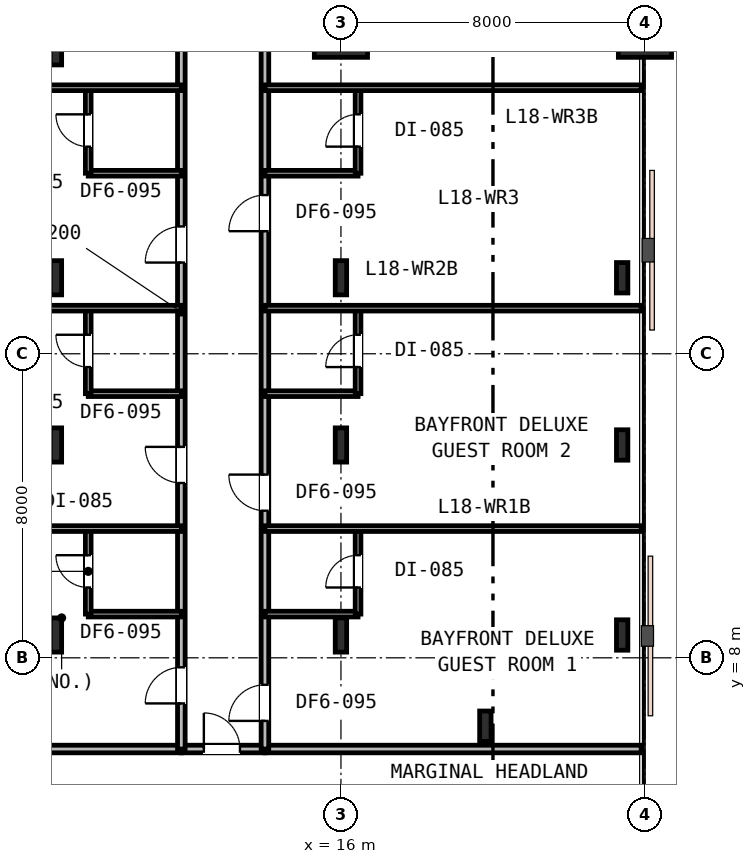
"""IFC4 building model, lengths in metres.
Left out: names, types, materials, properties, quantities, classifications, styles, units other than length and angle.
Written with IfcOpenShell. Run it as: python <this file> out.ifc"""

import sys

from ifc_helpers import new_model, si_unit, direction, frame, frame_2d, origin, origin_2d, place, context, subcontext, project, spatial, rectangle, i_section, extrude, element, fill, save


model = new_model("IFC4")
c1 = context("Model", 3, precision=1e-05, world=origin(), true_north=direction((0.0, 1.0)))
c2 = subcontext(c1, "Body", "Model", "MODEL_VIEW")
j1 = project(units=[si_unit("LENGTHUNIT", "METRE"), si_unit("PLANEANGLEUNIT", "RADIAN")], contexts=[c1])
p1 = place(None, origin())
s1 = spatial("IfcSite", under=j1, at=p1, CompositionType="ELEMENT")
p2 = place(p1, origin())
s2 = spatial("IfcBuilding", under=s1, at=p2, CompositionType="ELEMENT")
p3 = place(p2, frame((0.0, 0.0, 72.6)))
s3 = spatial("IfcBuildingStorey", under=s2, at=p3, CompositionType="ELEMENT", Elevation=72.6)
p4 = place(p3, frame((8.5, 24.0, 0.0), z_axis=(0.0, 0.0, 1.0), x_axis=(1.0, 0.0, 0.0)))
e1 = element("IfcColumn", 1, at=p4, inside=s3, PredefinedType="COLUMN", context=c2, shape_type="SweptSolid", body=[
    extrude(i_section(OverallWidth=0.3, OverallDepth=0.8, WebThickness=0.018, FlangeThickness=0.033, FilletRadius=0.03, at=origin_2d()), origin(), (0.0, 0.0, 1.0), 3.6),
])
for number, where, z_axis, x_axis in (
    (2, (16.0, 24.5, 0.0), (0.0, 0.0, 1.0), (1.0, 0.0, 0.0)),
    (3, (24.0, 24.5, 0.0), (0.0, 0.0, 1.0), (1.0, 0.0, 0.0)),
):
    element("IfcColumn", number, at=place(p3, frame(where, z_axis=z_axis, x_axis=x_axis)), inside=s3, PredefinedType="COLUMN", context=c2, shape_type="SweptSolid", body=[
        extrude(rectangle(XDim=1.4, YDim=1.4, at=origin_2d()), origin(), (0.0, 0.0, 1.0), 3.6),
    ])
for number, where, z_axis, x_axis in (
    (4, (19.8, 6.2, 0.0), (0.0, 0.0, 1.0), (1.0, 0.0, 0.0)),
    (5, (23.4, 8.6, 0.0), (0.0, 0.0, 1.0), (1.0, 0.0, 0.0)),
    (6, (23.4, 13.6, 0.0), (0.0, 0.0, 1.0), (1.0, 0.0, 0.0)),
    (7, (23.4, 18.0, 0.0), (0.0, 0.0, 1.0), (1.0, 0.0, 0.0)),
):
    element("IfcColumn", number, at=place(p3, frame(where, z_axis=z_axis, x_axis=x_axis)), inside=s3, PredefinedType="COLUMN", context=c2, shape_type="SweptSolid", body=[
        extrude(i_section(OverallWidth=0.3, OverallDepth=0.8, WebThickness=0.018, FlangeThickness=0.033, FilletRadius=0.03, at=origin_2d()), origin(), (0.0, 0.0, 1.0), 3.6),
    ])
for number, where, z_axis, x_axis in (
    (8, (8.5, 8.6, 0.0), (0.0, 0.0, 1.0), (1.0, 0.0, 0.0)),
    (9, (16.0, 8.6, 0.0), (0.0, 0.0, 1.0), (1.0, 0.0, 0.0)),
    (10, (8.5, 13.6, 0.0), (0.0, 0.0, 1.0), (1.0, 0.0, 0.0)),
    (11, (16.0, 13.6, 0.0), (0.0, 0.0, 1.0), (1.0, 0.0, 0.0)),
    (12, (8.5, 18.0, 0.0), (0.0, 0.0, 1.0), (1.0, 0.0, 0.0)),
    (13, (16.0, 18.0, 0.0), (0.0, 0.0, 1.0), (1.0, 0.0, 0.0)),
):
    element("IfcColumn", number, at=place(p3, frame(where, z_axis=z_axis, x_axis=x_axis)), inside=s3, PredefinedType="COLUMN", context=c2, shape_type="SweptSolid", body=[
        extrude(i_section(OverallWidth=0.3, OverallDepth=0.9, WebThickness=0.018, FlangeThickness=0.035, FilletRadius=0.03, at=origin_2d()), origin(), (0.0, 0.0, 1.0), 3.6),
    ])
p5 = place(p3, frame((0.1, 5.6, 0.0), z_axis=(0.0, 0.0, 1.0), x_axis=(1.0, 0.0, 0.0)))
e14 = element("IfcWall", 14, at=p5, inside=s3, PredefinedType="PARTITIONING", context=c2, shape_type="SweptSolid", body=[
    extrude(rectangle(XDim=11.7, YDim=0.2, at=frame_2d((5.85, 0.0))), origin(), (0.0, 0.0, 1.0), 2.92),
])
p6 = place(p3, frame((14.0, 5.6, 0.0), z_axis=(0.0, 0.0, 1.0), x_axis=(1.0, 0.0, 0.0)))
e15 = element("IfcWall", 15, at=p6, inside=s3, PredefinedType="PARTITIONING", context=c2, shape_type="SweptSolid", body=[
    extrude(rectangle(XDim=9.9, YDim=0.2, at=frame_2d((4.95, 0.0))), origin(), (0.0, 0.0, 1.0), 2.83),
])
p7 = place(p3, frame((11.8, 5.6, 0.0), z_axis=(0.0, 0.0, 1.0), x_axis=(1.0, 0.0, 0.0)))
e16 = element("IfcWall", 16, at=p7, inside=s3, PredefinedType="PARTITIONING", context=c2, shape_type="SweptSolid", body=[
    extrude(rectangle(XDim=2.2, YDim=0.2, at=frame_2d((1.1, 0.0))), origin(), (0.0, 0.0, 1.0), 3.33),
])
p8 = place(p7, frame((0.593, 0.0, 0.0)))
e17 = element("IfcOpeningElement", 17, at=p8, cuts=e16, PredefinedType="OPENING", context=c2, shape_type="SweptSolid", body=[
    extrude(rectangle(XDim=0.95, YDim=2.15, at=frame_2d((0.475, 1.075))), frame((0.0, 0.11, 0.0), z_axis=(0.0, -1.0, 0.0), x_axis=(1.0, 0.0, 0.0)), (0.0, 0.0, 1.0), 0.22),
])
p9 = place(p3, frame((11.8, 5.6, 0.0), z_axis=(0.0, 0.0, 1.0), x_axis=(0.0, 1.0, 0.0)))
e18 = element("IfcWall", 18, at=p9, inside=s3, PredefinedType="PARTITIONING", context=c2, shape_type="SweptSolid", body=[
    extrude(rectangle(XDim=23.0, YDim=0.2, at=frame_2d((11.5, 0.0))), origin(), (0.0, 0.0, 1.0), 2.83),
])
p10 = place(p9, frame((1.2, 0.0, 0.0)))
e19 = element("IfcOpeningElement", 19, at=p10, cuts=e18, PredefinedType="OPENING", context=c2, shape_type="SweptSolid", body=[
    extrude(rectangle(XDim=0.95, YDim=2.15, at=frame_2d((0.475, 1.075))), frame((0.0, 0.11, 0.0), z_axis=(0.0, -1.0, 0.0), x_axis=(1.0, 0.0, 0.0)), (0.0, 0.0, 1.0), 0.22),
])
p11 = place(p9, frame((7.0, 0.0, 0.0)))
e20 = element("IfcOpeningElement", 20, at=p11, cuts=e18, PredefinedType="OPENING", context=c2, shape_type="SweptSolid", body=[
    extrude(rectangle(XDim=0.95, YDim=2.15, at=frame_2d((0.475, 1.075))), frame((0.0, 0.11, 0.0), z_axis=(0.0, -1.0, 0.0), x_axis=(1.0, 0.0, 0.0)), (0.0, 0.0, 1.0), 0.22),
])
p12 = place(p9, frame((12.8, 0.0, 0.0)))
e21 = element("IfcOpeningElement", 21, at=p12, cuts=e18, PredefinedType="OPENING", context=c2, shape_type="SweptSolid", body=[
    extrude(rectangle(XDim=0.95, YDim=2.15, at=frame_2d((0.475, 1.075))), frame((0.0, 0.11, 0.0), z_axis=(0.0, -1.0, 0.0), x_axis=(1.0, 0.0, 0.0)), (0.0, 0.0, 1.0), 0.22),
])
p13 = place(p9, frame((18.515, 0.0, 0.0)))
e22 = element("IfcOpeningElement", 22, at=p13, cuts=e18, PredefinedType="OPENING", context=c2, shape_type="SweptSolid", body=[
    extrude(rectangle(XDim=0.95, YDim=2.15, at=frame_2d((0.475, 1.075))), frame((0.0, 0.11, 0.0), z_axis=(0.0, -1.0, 0.0), x_axis=(1.0, 0.0, 0.0)), (0.0, 0.0, 1.0), 0.22),
])
p14 = place(p3, frame((9.35, 9.15, 0.0), z_axis=(0.0, 0.0, 1.0), x_axis=(1.0, 0.0, 0.0)))
e23 = element("IfcWall", 23, at=p14, inside=s3, PredefinedType="PARTITIONING", context=c2, shape_type="SweptSolid", body=[
    extrude(rectangle(XDim=2.45, YDim=0.15, at=frame_2d((1.225, 0.0))), origin(), (0.0, 0.0, 1.0), 3.02),
])
p15 = place(p3, frame((9.35, 9.15, 0.0), z_axis=(0.0, 0.0, 1.0), x_axis=(0.0, 1.0, 0.0)))
e24 = element("IfcWall", 24, at=p15, inside=s3, PredefinedType="PARTITIONING", context=c2, shape_type="SweptSolid", body=[
    extrude(rectangle(XDim=2.25, YDim=0.15, at=frame_2d((1.125, 0.0))), origin(), (0.0, 0.0, 1.0), 3.33),
])
p16 = place(p15, frame((0.7, 0.0, 0.0)))
e25 = element("IfcOpeningElement", 25, at=p16, cuts=e24, PredefinedType="OPENING", context=c2, shape_type="SweptSolid", body=[
    extrude(rectangle(XDim=0.85, YDim=2.15, at=frame_2d((0.425, 1.075))), frame((0.0, 0.085, 0.0), z_axis=(0.0, -1.0, 0.0), x_axis=(1.0, 0.0, 0.0)), (0.0, 0.0, 1.0), 0.17),
])
p17 = place(p3, frame((0.1, 11.4, 0.0), z_axis=(0.0, 0.0, 1.0), x_axis=(1.0, 0.0, 0.0)))
e26 = element("IfcWall", 26, at=p17, inside=s3, PredefinedType="PARTITIONING", context=c2, shape_type="SweptSolid", body=[
    extrude(rectangle(XDim=11.7, YDim=0.15, at=frame_2d((5.85, 0.0))), origin(), (0.0, 0.0, 1.0), 2.83),
])
p18 = place(p3, frame((14.0, 5.6, 0.0), z_axis=(0.0, 0.0, 1.0), x_axis=(0.0, 1.0, 0.0)))
e27 = element("IfcWall", 27, at=p18, inside=s3, PredefinedType="PARTITIONING", context=c2, shape_type="SweptSolid", body=[
    extrude(rectangle(XDim=23.0, YDim=0.2, at=frame_2d((11.5, 0.0))), origin(), (0.0, 0.0, 1.0), 2.83),
])
p19 = place(p18, frame((0.74, 0.0, 0.0)))
e28 = element("IfcOpeningElement", 28, at=p19, cuts=e27, PredefinedType="OPENING", context=c2, shape_type="SweptSolid", body=[
    extrude(rectangle(XDim=0.95, YDim=2.15, at=frame_2d((0.475, 1.075))), frame((0.0, 0.11, 0.0), z_axis=(0.0, -1.0, 0.0), x_axis=(1.0, 0.0, 0.0)), (0.0, 0.0, 1.0), 0.22),
])
p20 = place(p18, frame((6.271, 0.0, 0.0)))
e29 = element("IfcOpeningElement", 29, at=p20, cuts=e27, PredefinedType="OPENING", context=c2, shape_type="SweptSolid", body=[
    extrude(rectangle(XDim=0.95, YDim=2.15, at=frame_2d((0.475, 1.075))), frame((0.0, 0.11, 0.0), z_axis=(0.0, -1.0, 0.0), x_axis=(1.0, 0.0, 0.0)), (0.0, 0.0, 1.0), 0.22),
])
p21 = place(p18, frame((13.626, 0.0, 0.0)))
e30 = element("IfcOpeningElement", 30, at=p21, cuts=e27, PredefinedType="OPENING", context=c2, shape_type="SweptSolid", body=[
    extrude(rectangle(XDim=0.95, YDim=2.15, at=frame_2d((0.475, 1.075))), frame((0.0, 0.11, 0.0), z_axis=(0.0, -1.0, 0.0), x_axis=(1.0, 0.0, 0.0)), (0.0, 0.0, 1.0), 0.22),
])
p22 = place(p18, frame((20.393, 0.0, 0.0)))
e31 = element("IfcOpeningElement", 31, at=p22, cuts=e27, PredefinedType="OPENING", context=c2, shape_type="SweptSolid", body=[
    extrude(rectangle(XDim=0.95, YDim=2.15, at=frame_2d((0.475, 1.075))), frame((0.0, 0.11, 0.0), z_axis=(0.0, -1.0, 0.0), x_axis=(1.0, 0.0, 0.0)), (0.0, 0.0, 1.0), 0.22),
])
p23 = place(p3, frame((14.0, 9.15, 0.0), z_axis=(0.0, 0.0, 1.0), x_axis=(1.0, 0.0, 0.0)))
e32 = element("IfcWall", 32, at=p23, inside=s3, PredefinedType="PARTITIONING", context=c2, shape_type="SweptSolid", body=[
    extrude(rectangle(XDim=2.45, YDim=0.15, at=frame_2d((1.225, 0.0))), origin(), (0.0, 0.0, 1.0), 2.83),
])
p24 = place(p3, frame((16.45, 9.15, 0.0), z_axis=(0.0, 0.0, 1.0), x_axis=(0.0, 1.0, 0.0)))
e33 = element("IfcWall", 33, at=p24, inside=s3, PredefinedType="PARTITIONING", context=c2, shape_type="SweptSolid", body=[
    extrude(rectangle(XDim=2.25, YDim=0.15, at=frame_2d((1.125, 0.0))), origin(), (0.0, 0.0, 1.0), 2.83),
])
p25 = place(p24, frame((0.7, 0.0, 0.0)))
e34 = element("IfcOpeningElement", 34, at=p25, cuts=e33, PredefinedType="OPENING", context=c2, shape_type="SweptSolid", body=[
    extrude(rectangle(XDim=0.85, YDim=2.15, at=frame_2d((0.425, 1.075))), frame((0.0, 0.085, 0.0), z_axis=(0.0, -1.0, 0.0), x_axis=(1.0, 0.0, 0.0)), (0.0, 0.0, 1.0), 0.17),
])
p26 = place(p3, frame((14.0, 11.4, 0.0), z_axis=(0.0, 0.0, 1.0), x_axis=(1.0, 0.0, 0.0)))
e35 = element("IfcWall", 35, at=p26, inside=s3, PredefinedType="PARTITIONING", context=c2, shape_type="SweptSolid", body=[
    extrude(rectangle(XDim=9.9, YDim=0.15, at=frame_2d((4.95, 0.0))), origin(), (0.0, 0.0, 1.0), 2.83),
])
p27 = place(p3, frame((9.35, 14.95, 0.0), z_axis=(0.0, 0.0, 1.0), x_axis=(1.0, 0.0, 0.0)))
e36 = element("IfcWall", 36, at=p27, inside=s3, PredefinedType="PARTITIONING", context=c2, shape_type="SweptSolid", body=[
    extrude(rectangle(XDim=2.45, YDim=0.15, at=frame_2d((1.225, 0.0))), origin(), (0.0, 0.0, 1.0), 3.02),
])
p28 = place(p3, frame((9.35, 14.95, 0.0), z_axis=(0.0, 0.0, 1.0), x_axis=(0.0, 1.0, 0.0)))
e37 = element("IfcWall", 37, at=p28, inside=s3, PredefinedType="PARTITIONING", context=c2, shape_type="SweptSolid", body=[
    extrude(rectangle(XDim=2.25, YDim=0.15, at=frame_2d((1.125, 0.0))), origin(), (0.0, 0.0, 1.0), 3.33),
])
p29 = place(p28, frame((0.7, 0.0, 0.0)))
e38 = element("IfcOpeningElement", 38, at=p29, cuts=e37, PredefinedType="OPENING", context=c2, shape_type="SweptSolid", body=[
    extrude(rectangle(XDim=0.85, YDim=2.15, at=frame_2d((0.425, 1.075))), frame((0.0, 0.085, 0.0), z_axis=(0.0, -1.0, 0.0), x_axis=(1.0, 0.0, 0.0)), (0.0, 0.0, 1.0), 0.17),
])
p30 = place(p3, frame((0.1, 17.2, 0.0), z_axis=(0.0, 0.0, 1.0), x_axis=(1.0, 0.0, 0.0)))
e39 = element("IfcWall", 39, at=p30, inside=s3, PredefinedType="PARTITIONING", context=c2, shape_type="SweptSolid", body=[
    extrude(rectangle(XDim=11.7, YDim=0.15, at=frame_2d((5.85, 0.0))), origin(), (0.0, 0.0, 1.0), 2.83),
])
p31 = place(p3, frame((14.0, 14.95, 0.0), z_axis=(0.0, 0.0, 1.0), x_axis=(1.0, 0.0, 0.0)))
e40 = element("IfcWall", 40, at=p31, inside=s3, PredefinedType="PARTITIONING", context=c2, shape_type="SweptSolid", body=[
    extrude(rectangle(XDim=2.45, YDim=0.15, at=frame_2d((1.225, 0.0))), origin(), (0.0, 0.0, 1.0), 2.83),
])
p32 = place(p3, frame((16.45, 14.95, 0.0), z_axis=(0.0, 0.0, 1.0), x_axis=(0.0, 1.0, 0.0)))
e41 = element("IfcWall", 41, at=p32, inside=s3, PredefinedType="PARTITIONING", context=c2, shape_type="SweptSolid", body=[
    extrude(rectangle(XDim=2.25, YDim=0.15, at=frame_2d((1.125, 0.0))), origin(), (0.0, 0.0, 1.0), 2.83),
])
p33 = place(p32, frame((0.7, 0.0, 0.0)))
e42 = element("IfcOpeningElement", 42, at=p33, cuts=e41, PredefinedType="OPENING", context=c2, shape_type="SweptSolid", body=[
    extrude(rectangle(XDim=0.85, YDim=2.15, at=frame_2d((0.425, 1.075))), frame((0.0, 0.085, 0.0), z_axis=(0.0, -1.0, 0.0), x_axis=(1.0, 0.0, 0.0)), (0.0, 0.0, 1.0), 0.17),
])
p34 = place(p3, frame((14.0, 17.2, 0.0), z_axis=(0.0, 0.0, 1.0), x_axis=(1.0, 0.0, 0.0)))
e43 = element("IfcWall", 43, at=p34, inside=s3, PredefinedType="PARTITIONING", context=c2, shape_type="SweptSolid", body=[
    extrude(rectangle(XDim=9.9, YDim=0.15, at=frame_2d((4.95, 0.0))), origin(), (0.0, 0.0, 1.0), 2.83),
])
p35 = place(p3, frame((9.35, 20.75, 0.0), z_axis=(0.0, 0.0, 1.0), x_axis=(1.0, 0.0, 0.0)))
e44 = element("IfcWall", 44, at=p35, inside=s3, PredefinedType="PARTITIONING", context=c2, shape_type="SweptSolid", body=[
    extrude(rectangle(XDim=2.45, YDim=0.15, at=frame_2d((1.225, 0.0))), origin(), (0.0, 0.0, 1.0), 3.33),
])
p36 = place(p3, frame((9.35, 20.75, 0.0), z_axis=(0.0, 0.0, 1.0), x_axis=(0.0, 1.0, 0.0)))
e45 = element("IfcWall", 45, at=p36, inside=s3, PredefinedType="PARTITIONING", context=c2, shape_type="SweptSolid", body=[
    extrude(rectangle(XDim=2.25, YDim=0.15, at=frame_2d((1.125, 0.0))), origin(), (0.0, 0.0, 1.0), 3.33),
])
p37 = place(p36, frame((0.7, 0.0, 0.0)))
e46 = element("IfcOpeningElement", 46, at=p37, cuts=e45, PredefinedType="OPENING", context=c2, shape_type="SweptSolid", body=[
    extrude(rectangle(XDim=0.85, YDim=2.15, at=frame_2d((0.425, 1.075))), frame((0.0, 0.085, 0.0), z_axis=(0.0, -1.0, 0.0), x_axis=(1.0, 0.0, 0.0)), (0.0, 0.0, 1.0), 0.17),
])
p38 = place(p3, frame((0.1, 23.0, 0.0), z_axis=(0.0, 0.0, 1.0), x_axis=(1.0, 0.0, 0.0)))
e47 = element("IfcWall", 47, at=p38, inside=s3, PredefinedType="PARTITIONING", context=c2, shape_type="SweptSolid", body=[
    extrude(rectangle(XDim=11.7, YDim=0.15, at=frame_2d((5.85, 0.0))), origin(), (0.0, 0.0, 1.0), 2.83),
])
p39 = place(p3, frame((14.0, 20.75, 0.0), z_axis=(0.0, 0.0, 1.0), x_axis=(1.0, 0.0, 0.0)))
e48 = element("IfcWall", 48, at=p39, inside=s3, PredefinedType="PARTITIONING", context=c2, shape_type="SweptSolid", body=[
    extrude(rectangle(XDim=2.45, YDim=0.15, at=frame_2d((1.225, 0.0))), origin(), (0.0, 0.0, 1.0), 2.83),
])
p40 = place(p3, frame((16.45, 20.75, 0.0), z_axis=(0.0, 0.0, 1.0), x_axis=(0.0, 1.0, 0.0)))
e49 = element("IfcWall", 49, at=p40, inside=s3, PredefinedType="PARTITIONING", context=c2, shape_type="SweptSolid", body=[
    extrude(rectangle(XDim=2.25, YDim=0.15, at=frame_2d((1.125, 0.0))), origin(), (0.0, 0.0, 1.0), 2.83),
])
p41 = place(p40, frame((0.7, 0.0, 0.0)))
e50 = element("IfcOpeningElement", 50, at=p41, cuts=e49, PredefinedType="OPENING", context=c2, shape_type="SweptSolid", body=[
    extrude(rectangle(XDim=0.85, YDim=2.15, at=frame_2d((0.425, 1.075))), frame((0.0, 0.085, 0.0), z_axis=(0.0, -1.0, 0.0), x_axis=(1.0, 0.0, 0.0)), (0.0, 0.0, 1.0), 0.17),
])
p42 = place(p3, frame((14.0, 23.0, 0.0), z_axis=(0.0, 0.0, 1.0), x_axis=(1.0, 0.0, 0.0)))
e51 = element("IfcWall", 51, at=p42, inside=s3, PredefinedType="PARTITIONING", context=c2, shape_type="SweptSolid", body=[
    extrude(rectangle(XDim=9.9, YDim=0.15, at=frame_2d((4.95, 0.0))), origin(), (0.0, 0.0, 1.0), 2.83),
])
p43 = place(p8, origin())
e52 = element("IfcDoor", 52, at=p43, inside=s3, OperationType="SINGLE_SWING_LEFT", PredefinedType="DOOR", context=c2, shape_type="SweptSolid", body=[
    extrude(rectangle(XDim=0.95, YDim=2.15, at=frame_2d((0.475, 1.075))), frame((0.0, 0.025, 0.0), z_axis=(0.0, -1.0, 0.0), x_axis=(1.0, 0.0, 0.0)), (0.0, 0.0, 1.0), 0.05),
])
fill(e17, e52)
p44 = place(p10, origin())
e53 = element("IfcDoor", 53, at=p44, inside=s3, OperationType="SINGLE_SWING_LEFT", PredefinedType="DOOR", context=c2, shape_type="SweptSolid", body=[
    extrude(rectangle(XDim=0.95, YDim=2.15, at=frame_2d((0.475, 1.075))), frame((0.0, 0.025, 0.0), z_axis=(0.0, -1.0, 0.0), x_axis=(1.0, 0.0, 0.0)), (0.0, 0.0, 1.0), 0.05),
])
fill(e19, e53)
p45 = place(p16, origin())
e54 = element("IfcDoor", 54, at=p45, inside=s3, OperationType="SINGLE_SWING_RIGHT", PredefinedType="DOOR", context=c2, shape_type="SweptSolid", body=[
    extrude(rectangle(XDim=0.85, YDim=2.15, at=frame_2d((0.425, 1.075))), frame((0.0, 0.025, 0.0), z_axis=(0.0, -1.0, 0.0), x_axis=(1.0, 0.0, 0.0)), (0.0, 0.0, 1.0), 0.05),
])
fill(e25, e54)
p46 = place(p19, origin())
e55 = element("IfcDoor", 55, at=p46, inside=s3, OperationType="SINGLE_SWING_LEFT", PredefinedType="DOOR", context=c2, shape_type="SweptSolid", body=[
    extrude(rectangle(XDim=0.95, YDim=2.15, at=frame_2d((0.475, 1.075))), frame((0.0, 0.025, 0.0), z_axis=(0.0, -1.0, 0.0), x_axis=(1.0, 0.0, 0.0)), (0.0, 0.0, 1.0), 0.05),
])
fill(e28, e55)
p47 = place(p25, origin())
e56 = element("IfcDoor", 56, at=p47, inside=s3, OperationType="SINGLE_SWING_LEFT", PredefinedType="DOOR", context=c2, shape_type="SweptSolid", body=[
    extrude(rectangle(XDim=0.85, YDim=2.15, at=frame_2d((0.425, 1.075))), frame((0.0, 0.025, 0.0), z_axis=(0.0, -1.0, 0.0), x_axis=(1.0, 0.0, 0.0)), (0.0, 0.0, 1.0), 0.05),
])
fill(e34, e56)
p48 = place(p11, origin())
e57 = element("IfcDoor", 57, at=p48, inside=s3, OperationType="SINGLE_SWING_RIGHT", PredefinedType="DOOR", context=c2, shape_type="SweptSolid", body=[
    extrude(rectangle(XDim=0.95, YDim=2.15, at=frame_2d((0.475, 1.075))), frame((0.0, 0.025, 0.0), z_axis=(0.0, -1.0, 0.0), x_axis=(1.0, 0.0, 0.0)), (0.0, 0.0, 1.0), 0.05),
])
fill(e20, e57)
p49 = place(p29, origin())
e58 = element("IfcDoor", 58, at=p49, inside=s3, OperationType="SINGLE_SWING_RIGHT", PredefinedType="DOOR", context=c2, shape_type="SweptSolid", body=[
    extrude(rectangle(XDim=0.85, YDim=2.15, at=frame_2d((0.425, 1.075))), frame((0.0, 0.025, 0.0), z_axis=(0.0, -1.0, 0.0), x_axis=(1.0, 0.0, 0.0)), (0.0, 0.0, 1.0), 0.05),
])
fill(e38, e58)
p50 = place(p20, origin())
e59 = element("IfcDoor", 59, at=p50, inside=s3, OperationType="SINGLE_SWING_RIGHT", PredefinedType="DOOR", context=c2, shape_type="SweptSolid", body=[
    extrude(rectangle(XDim=0.95, YDim=2.15, at=frame_2d((0.475, 1.075))), frame((0.0, 0.025, 0.0), z_axis=(0.0, -1.0, 0.0), x_axis=(1.0, 0.0, 0.0)), (0.0, 0.0, 1.0), 0.05),
])
fill(e29, e59)
p51 = place(p33, origin())
e60 = element("IfcDoor", 60, at=p51, inside=s3, OperationType="SINGLE_SWING_LEFT", PredefinedType="DOOR", context=c2, shape_type="SweptSolid", body=[
    extrude(rectangle(XDim=0.85, YDim=2.15, at=frame_2d((0.425, 1.075))), frame((0.0, 0.025, 0.0), z_axis=(0.0, -1.0, 0.0), x_axis=(1.0, 0.0, 0.0)), (0.0, 0.0, 1.0), 0.05),
])
fill(e42, e60)
p52 = place(p12, origin())
e61 = element("IfcDoor", 61, at=p52, inside=s3, OperationType="SINGLE_SWING_LEFT", PredefinedType="DOOR", context=c2, shape_type="SweptSolid", body=[
    extrude(rectangle(XDim=0.95, YDim=2.15, at=frame_2d((0.475, 1.075))), frame((0.0, 0.025, 0.0), z_axis=(0.0, -1.0, 0.0), x_axis=(1.0, 0.0, 0.0)), (0.0, 0.0, 1.0), 0.05),
])
fill(e21, e61)
p53 = place(p37, origin())
e62 = element("IfcDoor", 62, at=p53, inside=s3, OperationType="SINGLE_SWING_RIGHT", PredefinedType="DOOR", context=c2, shape_type="SweptSolid", body=[
    extrude(rectangle(XDim=0.85, YDim=2.15, at=frame_2d((0.425, 1.075))), frame((0.0, 0.025, 0.0), z_axis=(0.0, -1.0, 0.0), x_axis=(1.0, 0.0, 0.0)), (0.0, 0.0, 1.0), 0.05),
])
fill(e46, e62)
p54 = place(p21, origin())
e63 = element("IfcDoor", 63, at=p54, inside=s3, OperationType="SINGLE_SWING_LEFT", PredefinedType="DOOR", context=c2, shape_type="SweptSolid", body=[
    extrude(rectangle(XDim=0.95, YDim=2.15, at=frame_2d((0.475, 1.075))), frame((0.0, 0.025, 0.0), z_axis=(0.0, -1.0, 0.0), x_axis=(1.0, 0.0, 0.0)), (0.0, 0.0, 1.0), 0.05),
])
fill(e30, e63)
p55 = place(p41, origin())
e64 = element("IfcDoor", 64, at=p55, inside=s3, OperationType="SINGLE_SWING_LEFT", PredefinedType="DOOR", context=c2, shape_type="SweptSolid", body=[
    extrude(rectangle(XDim=0.85, YDim=2.15, at=frame_2d((0.425, 1.075))), frame((0.0, 0.025, 0.0), z_axis=(0.0, -1.0, 0.0), x_axis=(1.0, 0.0, 0.0)), (0.0, 0.0, 1.0), 0.05),
])
fill(e50, e64)
save(model, sys.argv[1])
